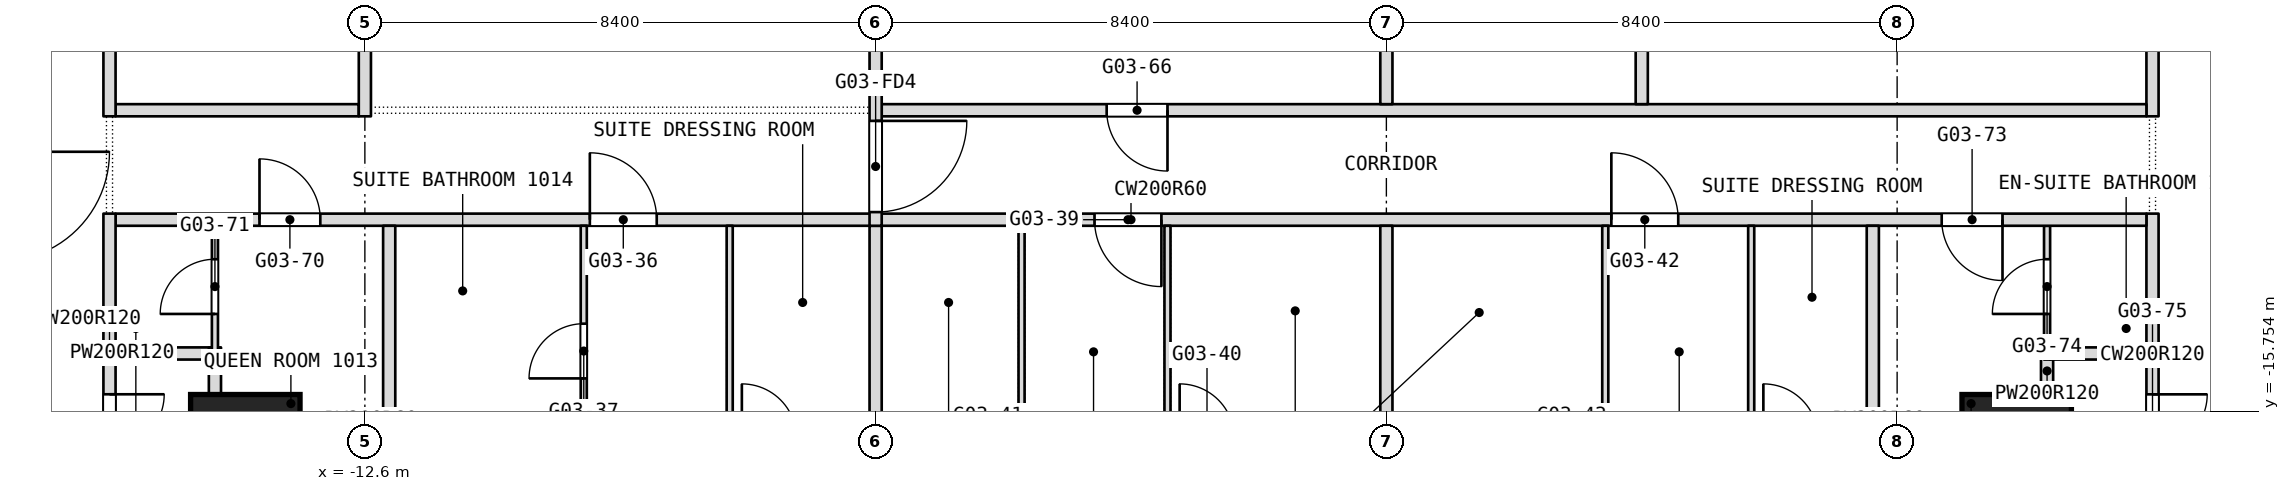
"""IFC4 building model, lengths in metres.
Left out: names, types, materials, properties, quantities, classifications, styles, units other than length and angle.
Written with IfcOpenShell. Run it as: python <this file> out.ifc"""

import sys

from ifc_helpers import new_model, si_unit, direction, frame, frame_2d, origin, origin_2d, place, context, subcontext, project, spatial, rectangle, extrude, element, fill, save


model = new_model("IFC4")
c1 = context("Model", 3, precision=1e-05, world=origin(), true_north=direction((0.0, 1.0)))
c2 = subcontext(c1, "Body", "Model", "MODEL_VIEW")
j1 = project(units=[si_unit("LENGTHUNIT", "METRE"), si_unit("PLANEANGLEUNIT", "RADIAN")], contexts=[c1])
p1 = place(None, origin())
s1 = spatial("IfcSite", under=j1, at=p1, CompositionType="ELEMENT")
p2 = place(p1, origin())
s2 = spatial("IfcBuilding", under=s1, at=p2, CompositionType="ELEMENT")
p3 = place(p2, frame((0.0, 0.0, 50.9)))
s3 = spatial("IfcBuildingStorey", under=s2, at=p3, CompositionType="ELEMENT", Elevation=50.9)
for number, where, z_axis, x_axis in (
    (1, (-14.566, -16.375, 0.0), (0.0, 0.0, 1.0), (1.0, 0.0, 0.0)),
    (2, (14.566, -16.375, 0.0), (0.0, 0.0, 1.0), (1.0, 0.0, 0.0)),
):
    element("IfcColumn", number, at=place(p3, frame(where, z_axis=z_axis, x_axis=x_axis)), inside=s3, PredefinedType="COLUMN", context=c2, shape_type="SweptSolid", body=[
        extrude(rectangle(XDim=1.8, YDim=1.8, at=origin_2d()), origin(), (0.0, 0.0, 1.0), 3.6),
    ])
p4 = place(p3, frame((16.8, -17.143, 0.0), z_axis=(0.0, 0.0, 1.0), x_axis=(0.0, 1.0, 0.0)))
e3 = element("IfcWall", 3, at=p4, inside=s3, PredefinedType="PARTITIONING", context=c2, shape_type="SweptSolid", body=[
    extrude(rectangle(XDim=4.643, YDim=0.2, at=frame_2d((2.322, 0.0))), origin(), (0.0, 0.0, 1.0), 3.34),
])
p5 = place(p4, frame((0.771, 0.0, 0.0)))
e4 = element("IfcOpeningElement", 4, at=p5, cuts=e3, PredefinedType="OPENING", context=c2, shape_type="SweptSolid", body=[
    extrude(rectangle(XDim=0.9, YDim=2.1, at=frame_2d((0.45, 1.05))), frame((0.0, 0.1, 0.0), z_axis=(0.0, -1.0, 0.0), x_axis=(1.0, 0.0, 0.0)), (0.0, 0.0, 1.0), 0.2),
])
p6 = place(p3, frame((16.8, -10.9, 0.0), z_axis=(0.0, 0.0, 1.0), x_axis=(0.0, 1.0, 0.0)))
e5 = element("IfcWall", 5, at=p6, inside=s3, PredefinedType="PARTITIONING", context=c2, shape_type="SweptSolid", body=[
    extrude(rectangle(XDim=7.3, YDim=0.2, at=frame_2d((3.65, 0.0))), origin(), (0.0, 0.0, 1.0), 3.34),
])
p7 = place(p6, frame((3.15, 0.0, 0.0)))
e6 = element("IfcOpeningElement", 6, at=p7, cuts=e5, PredefinedType="OPENING", context=c2, shape_type="SweptSolid", body=[
    extrude(rectangle(XDim=1.0, YDim=2.1, at=frame_2d((0.5, 1.05))), frame((0.0, 0.1, 0.0), z_axis=(0.0, -1.0, 0.0), x_axis=(1.0, 0.0, 0.0)), (0.0, 0.0, 1.0), 0.2),
])
p8 = place(p3, frame((15.066, -15.475, 0.0), z_axis=(0.0, 0.0, 1.0), x_axis=(0.0, 1.0, 0.0)))
e7 = element("IfcWall", 7, at=p8, inside=s3, PredefinedType="PARTITIONING", context=c2, shape_type="SweptSolid", body=[
    extrude(rectangle(XDim=0.775, YDim=0.2, at=frame_2d((0.388, 0.0))), origin(), (0.0, 0.0, 1.0), 3.34),
])
p9 = place(p3, frame((15.066, -14.9, 0.0), z_axis=(0.0, 0.0, 1.0), x_axis=(0.0, 1.0, 0.0)))
e8 = element("IfcWall", 8, at=p9, inside=s3, PredefinedType="PARTITIONING", context=c2, shape_type="SweptSolid", body=[
    extrude(rectangle(XDim=2.2, YDim=0.1, at=frame_2d((1.1, 0.0))), origin(), (0.0, 0.0, 1.0), 3.34),
])
p10 = place(p9, frame((0.75, 0.0, 0.0)))
e9 = element("IfcOpeningElement", 9, at=p10, cuts=e8, PredefinedType="OPENING", context=c2, shape_type="SweptSolid", body=[
    extrude(rectangle(XDim=0.9, YDim=2.1, at=frame_2d((0.45, 1.05))), frame((0.0, 0.05, 0.0), z_axis=(0.0, -1.0, 0.0), x_axis=(1.0, 0.0, 0.0)), (0.0, 0.0, 1.0), 0.1),
])
for number, where, z_axis, x_axis in (
    (10, (-16.7, -14.8, 0.0), (0.0, 0.0, 1.0), (1.0, 0.0, 0.0)),
    (11, (15.116, -14.8, 0.0), (0.0, 0.0, 1.0), (1.0, 0.0, 0.0)),
):
    element("IfcWall", number, at=place(p3, frame(where, z_axis=z_axis, x_axis=x_axis)), inside=s3, PredefinedType="PARTITIONING", context=c2, shape_type="SweptSolid", body=[
        extrude(rectangle(XDim=1.584, YDim=0.2, at=frame_2d((0.792, 0.0))), origin(), (0.0, 0.0, 1.0), 3.34),
    ])
p11 = place(p3, frame((-16.7, -12.6, 0.0), z_axis=(0.0, 0.0, 1.0), x_axis=(1.0, 0.0, 0.0)))
e12 = element("IfcWall", 12, at=p11, inside=s3, PredefinedType="PARTITIONING", context=c2, shape_type="SweptSolid", body=[
    extrude(rectangle(XDim=33.4, YDim=0.2, at=frame_2d((16.7, 0.0))), origin(), (0.0, 0.0, 1.0), 3.34),
])
p12 = place(p11, frame((7.8, 0.0, 0.0)))
e13 = element("IfcOpeningElement", 13, at=p12, cuts=e12, PredefinedType="OPENING", context=c2, shape_type="SweptSolid", body=[
    extrude(rectangle(XDim=1.1, YDim=2.1, at=frame_2d((0.55, 1.05))), frame((0.0, 0.1, 0.0), z_axis=(0.0, -1.0, 0.0), x_axis=(1.0, 0.0, 0.0)), (0.0, 0.0, 1.0), 0.2),
])
p13 = place(p11, frame((16.1, 0.0, 0.0)))
e14 = element("IfcOpeningElement", 14, at=p13, cuts=e12, PredefinedType="OPENING", context=c2, shape_type="SweptSolid", body=[
    extrude(rectangle(XDim=1.1, YDim=2.1, at=frame_2d((0.55, 1.05))), frame((0.0, 0.1, 0.0), z_axis=(0.0, -1.0, 0.0), x_axis=(1.0, 0.0, 0.0)), (0.0, 0.0, 1.0), 0.2),
])
p14 = place(p11, frame((24.6, 0.0, 0.0)))
e15 = element("IfcOpeningElement", 15, at=p14, cuts=e12, PredefinedType="OPENING", context=c2, shape_type="SweptSolid", body=[
    extrude(rectangle(XDim=1.1, YDim=2.1, at=frame_2d((0.55, 1.05))), frame((0.0, 0.1, 0.0), z_axis=(0.0, -1.0, 0.0), x_axis=(1.0, 0.0, 0.0)), (0.0, 0.0, 1.0), 0.2),
])
p15 = place(p11, frame((2.367, 0.0, 0.0)))
e16 = element("IfcOpeningElement", 16, at=p15, cuts=e12, PredefinedType="OPENING", context=c2, shape_type="SweptSolid", body=[
    extrude(rectangle(XDim=1.0, YDim=2.1, at=frame_2d((0.5, 1.05))), frame((0.0, 0.1, 0.0), z_axis=(0.0, -1.0, 0.0), x_axis=(1.0, 0.0, 0.0)), (0.0, 0.0, 1.0), 0.2),
])
p16 = place(p11, frame((30.033, 0.0, 0.0)))
e17 = element("IfcOpeningElement", 17, at=p16, cuts=e12, PredefinedType="OPENING", context=c2, shape_type="SweptSolid", body=[
    extrude(rectangle(XDim=1.0, YDim=2.1, at=frame_2d((0.5, 1.05))), frame((0.0, 0.1, 0.0), z_axis=(0.0, -1.0, 0.0), x_axis=(1.0, 0.0, 0.0)), (0.0, 0.0, 1.0), 0.2),
])
p17 = place(p3, frame((12.2, -15.8, 0.0), z_axis=(0.0, 0.0, 1.0), x_axis=(0.0, 1.0, 0.0)))
e18 = element("IfcWall", 18, at=p17, inside=s3, PredefinedType="PARTITIONING", context=c2, shape_type="SweptSolid", body=[
    extrude(rectangle(XDim=3.1, YDim=0.2, at=frame_2d((1.55, 0.0))), origin(), (0.0, 0.0, 1.0), 3.34),
])
p18 = place(p3, frame((-16.7, -10.8, 0.0), z_axis=(0.0, 0.0, 1.0), x_axis=(1.0, 0.0, 0.0)))
e19 = element("IfcWall", 19, at=p18, inside=s3, PredefinedType="PARTITIONING", context=c2, shape_type="SweptSolid", body=[
    extrude(rectangle(XDim=4.0, YDim=0.2, at=frame_2d((2.0, 0.0))), origin(), (0.0, 0.0, 1.0), 3.34),
])
p19 = place(p3, frame((-4.1, -10.8, 0.0), z_axis=(0.0, 0.0, 1.0), x_axis=(1.0, 0.0, 0.0)))
e20 = element("IfcWall", 20, at=p19, inside=s3, PredefinedType="PARTITIONING", context=c2, shape_type="SweptSolid", body=[
    extrude(rectangle(XDim=20.8, YDim=0.2, at=frame_2d((10.4, 0.0))), origin(), (0.0, 0.0, 1.0), 3.34),
])
p20 = place(p19, frame((3.7, 0.0, 0.0)))
e21 = element("IfcOpeningElement", 21, at=p20, cuts=e20, PredefinedType="OPENING", context=c2, shape_type="SweptSolid", body=[
    extrude(rectangle(XDim=1.0, YDim=2.1, at=frame_2d((0.5, 1.05))), frame((0.0, 0.1, 0.0), z_axis=(0.0, -1.0, 0.0), x_axis=(1.0, 0.0, 0.0)), (0.0, 0.0, 1.0), 0.2),
])
p21 = place(p3, frame((10.2, -16.25, 0.0), z_axis=(0.0, 0.0, 1.0), x_axis=(0.0, 1.0, 0.0)))
e22 = element("IfcWall", 22, at=p21, inside=s3, PredefinedType="PARTITIONING", context=c2, shape_type="SweptSolid", body=[
    extrude(rectangle(XDim=3.55, YDim=0.1, at=frame_2d((1.775, 0.0))), origin(), (0.0, 0.0, 1.0), 3.34),
])
p22 = place(p3, frame((8.4, -10.7, 0.0), z_axis=(0.0, 0.0, 1.0), x_axis=(0.0, 1.0, 0.0)))
e23 = element("IfcWall", 23, at=p22, inside=s3, PredefinedType="PARTITIONING", context=c2, shape_type="SweptSolid", body=[
    extrude(rectangle(XDim=3.6, YDim=0.2, at=frame_2d((1.8, 0.0))), origin(), (0.0, 0.0, 1.0), 3.34),
])
p23 = place(p3, frame((7.8, -16.15, 0.0), z_axis=(0.0, 0.0, 1.0), x_axis=(0.0, 1.0, 0.0)))
e24 = element("IfcWall", 24, at=p23, inside=s3, PredefinedType="PARTITIONING", context=c2, shape_type="SweptSolid", body=[
    extrude(rectangle(XDim=3.45, YDim=0.1, at=frame_2d((1.725, 0.0))), origin(), (0.0, 0.0, 1.0), 3.34),
])
p24 = place(p3, frame((4.2, -17.7, 0.0), z_axis=(0.0, 0.0, 1.0), x_axis=(0.0, 1.0, 0.0)))
e25 = element("IfcWall", 25, at=p24, inside=s3, PredefinedType="PARTITIONING", context=c2, shape_type="SweptSolid", body=[
    extrude(rectangle(XDim=5.0, YDim=0.2, at=frame_2d((2.5, 0.0))), origin(), (0.0, 0.0, 1.0), 3.34),
])
p25 = place(p3, frame((4.2, -10.7, 0.0), z_axis=(0.0, 0.0, 1.0), x_axis=(0.0, 1.0, 0.0)))
e26 = element("IfcWall", 26, at=p25, inside=s3, PredefinedType="PARTITIONING", context=c2, shape_type="SweptSolid", body=[
    extrude(rectangle(XDim=8.8, YDim=0.2, at=frame_2d((4.4, 0.0))), origin(), (0.0, 0.0, 1.0), 3.34),
])
p26 = place(p3, frame((0.6, -16.25, 0.0), z_axis=(0.0, 0.0, 1.0), x_axis=(0.0, 1.0, 0.0)))
e27 = element("IfcWall", 27, at=p26, inside=s3, PredefinedType="PARTITIONING", context=c2, shape_type="SweptSolid", body=[
    extrude(rectangle(XDim=3.55, YDim=0.1, at=frame_2d((1.775, 0.0))), origin(), (0.0, 0.0, 1.0), 3.34),
])
p27 = place(p3, frame((-1.8, -16.15, 0.0), z_axis=(0.0, 0.0, 1.0), x_axis=(0.0, 1.0, 0.0)))
e28 = element("IfcWall", 28, at=p27, inside=s3, PredefinedType="PARTITIONING", context=c2, shape_type="SweptSolid", body=[
    extrude(rectangle(XDim=3.45, YDim=0.1, at=frame_2d((1.725, 0.0))), origin(), (0.0, 0.0, 1.0), 3.34),
])
p28 = place(p3, frame((-4.2, -17.7, 0.0), z_axis=(0.0, 0.0, 1.0), x_axis=(0.0, 1.0, 0.0)))
e29 = element("IfcWall", 29, at=p28, inside=s3, PredefinedType="PARTITIONING", context=c2, shape_type="SweptSolid", body=[
    extrude(rectangle(XDim=5.0, YDim=0.2, at=frame_2d((2.5, 0.0))), origin(), (0.0, 0.0, 1.0), 3.34),
])
p29 = place(p3, frame((-4.2, -12.7, 0.0), z_axis=(0.0, 0.0, 1.0), x_axis=(0.0, 1.0, 0.0)))
e30 = element("IfcWall", 30, at=p29, inside=s3, PredefinedType="PARTITIONING", context=c2, shape_type="SweptSolid", body=[
    extrude(rectangle(XDim=12.7, YDim=0.2, at=frame_2d((6.35, 0.0))), origin(), (0.0, 0.0, 1.0), 3.34),
])
p30 = place(p29, frame((11.05, 0.0, 0.0)))
e31 = element("IfcOpeningElement", 31, at=p30, cuts=e30, PredefinedType="OPENING", context=c2, shape_type="SweptSolid", body=[
    extrude(rectangle(XDim=1.5, YDim=2.1, at=frame_2d((0.75, 1.05))), frame((0.0, 0.1, 0.0), z_axis=(0.0, -1.0, 0.0), x_axis=(1.0, 0.0, 0.0)), (0.0, 0.0, 1.0), 0.2),
])
p31 = place(p29, frame((0.225, 0.0, 0.0)))
e32 = element("IfcOpeningElement", 32, at=p31, cuts=e30, PredefinedType="OPENING", context=c2, shape_type="SweptSolid", body=[
    extrude(rectangle(XDim=1.5, YDim=2.1, at=frame_2d((0.75, 1.05))), frame((0.0, 0.1, 0.0), z_axis=(0.0, -1.0, 0.0), x_axis=(1.0, 0.0, 0.0)), (0.0, 0.0, 1.0), 0.2),
])
p32 = place(p3, frame((-6.6, -16.25, 0.0), z_axis=(0.0, 0.0, 1.0), x_axis=(0.0, 1.0, 0.0)))
e33 = element("IfcWall", 33, at=p32, inside=s3, PredefinedType="PARTITIONING", context=c2, shape_type="SweptSolid", body=[
    extrude(rectangle(XDim=3.55, YDim=0.1, at=frame_2d((1.775, 0.0))), origin(), (0.0, 0.0, 1.0), 3.34),
])
p33 = place(p3, frame((-9.0, -16.15, 0.0), z_axis=(0.0, 0.0, 1.0), x_axis=(0.0, 1.0, 0.0)))
e34 = element("IfcWall", 34, at=p33, inside=s3, PredefinedType="PARTITIONING", context=c2, shape_type="SweptSolid", body=[
    extrude(rectangle(XDim=3.45, YDim=0.1, at=frame_2d((1.725, 0.0))), origin(), (0.0, 0.0, 1.0), 3.34),
])
p34 = place(p33, frame((0.94, 0.0, 0.0)))
e35 = element("IfcOpeningElement", 35, at=p34, cuts=e34, PredefinedType="OPENING", context=c2, shape_type="SweptSolid", body=[
    extrude(rectangle(XDim=0.9, YDim=2.1, at=frame_2d((0.45, 1.05))), frame((0.0, 0.05, 0.0), z_axis=(0.0, -1.0, 0.0), x_axis=(1.0, 0.0, 0.0)), (0.0, 0.0, 1.0), 0.1),
])
p35 = place(p3, frame((-12.2, -16.0, 0.0), z_axis=(0.0, 0.0, 1.0), x_axis=(0.0, 1.0, 0.0)))
e36 = element("IfcWall", 36, at=p35, inside=s3, PredefinedType="PARTITIONING", context=c2, shape_type="SweptSolid", body=[
    extrude(rectangle(XDim=3.3, YDim=0.2, at=frame_2d((1.65, 0.0))), origin(), (0.0, 0.0, 1.0), 3.34),
])
p36 = place(p3, frame((-12.6, -10.9, 0.0), z_axis=(0.0, 0.0, 1.0), x_axis=(0.0, 1.0, 0.0)))
e37 = element("IfcWall", 37, at=p36, inside=s3, PredefinedType="PARTITIONING", context=c2, shape_type="SweptSolid", body=[
    extrude(rectangle(XDim=5.6, YDim=0.2, at=frame_2d((2.8, 0.0))), origin(), (0.0, 0.0, 1.0), 3.34),
])
p37 = place(p3, frame((-15.066, -15.475, 0.0), z_axis=(0.0, 0.0, 1.0), x_axis=(0.0, 1.0, 0.0)))
e38 = element("IfcWall", 38, at=p37, inside=s3, PredefinedType="PARTITIONING", context=c2, shape_type="SweptSolid", body=[
    extrude(rectangle(XDim=0.775, YDim=0.2, at=frame_2d((0.388, 0.0))), origin(), (0.0, 0.0, 1.0), 3.34),
])
p38 = place(p3, frame((-15.066, -14.9, 0.0), z_axis=(0.0, 0.0, 1.0), x_axis=(0.0, 1.0, 0.0)))
e39 = element("IfcWall", 39, at=p38, inside=s3, PredefinedType="PARTITIONING", context=c2, shape_type="SweptSolid", body=[
    extrude(rectangle(XDim=2.2, YDim=0.1, at=frame_2d((1.1, 0.0))), origin(), (0.0, 0.0, 1.0), 3.34),
])
p39 = place(p38, frame((0.75, 0.0, 0.0)))
e40 = element("IfcOpeningElement", 40, at=p39, cuts=e39, PredefinedType="OPENING", context=c2, shape_type="SweptSolid", body=[
    extrude(rectangle(XDim=0.9, YDim=2.1, at=frame_2d((0.45, 1.05))), frame((0.0, 0.05, 0.0), z_axis=(0.0, -1.0, 0.0), x_axis=(1.0, 0.0, 0.0)), (0.0, 0.0, 1.0), 0.1),
])
p40 = place(p3, frame((-16.8, -17.143, 0.0), z_axis=(0.0, 0.0, 1.0), x_axis=(0.0, 1.0, 0.0)))
e41 = element("IfcWall", 41, at=p40, inside=s3, PredefinedType="PARTITIONING", context=c2, shape_type="SweptSolid", body=[
    extrude(rectangle(XDim=4.643, YDim=0.2, at=frame_2d((2.322, 0.0))), origin(), (0.0, 0.0, 1.0), 3.34),
])
p41 = place(p40, frame((0.772, 0.0, 0.0)))
e42 = element("IfcOpeningElement", 42, at=p41, cuts=e41, PredefinedType="OPENING", context=c2, shape_type="SweptSolid", body=[
    extrude(rectangle(XDim=0.9, YDim=2.1, at=frame_2d((0.45, 1.05))), frame((0.0, 0.1, 0.0), z_axis=(0.0, -1.0, 0.0), x_axis=(1.0, 0.0, 0.0)), (0.0, 0.0, 1.0), 0.2),
])
p42 = place(p3, frame((-16.8, -10.9, 0.0), z_axis=(0.0, 0.0, 1.0), x_axis=(0.0, 1.0, 0.0)))
e43 = element("IfcWall", 43, at=p42, inside=s3, PredefinedType="PARTITIONING", context=c2, shape_type="SweptSolid", body=[
    extrude(rectangle(XDim=9.0, YDim=0.2, at=frame_2d((4.5, 0.0))), origin(), (0.0, 0.0, 1.0), 3.34),
])
p43 = place(p5, origin())
e44 = element("IfcDoor", 44, at=p43, inside=s3, OperationType="SINGLE_SWING_RIGHT", PredefinedType="DOOR", context=c2, shape_type="SweptSolid", body=[
    extrude(rectangle(XDim=0.9, YDim=2.1, at=frame_2d((0.45, 1.05))), frame((0.0, 0.025, 0.0), z_axis=(0.0, -1.0, 0.0), x_axis=(1.0, 0.0, 0.0)), (0.0, 0.0, 1.0), 0.05),
])
fill(e4, e44)
p44 = place(p10, origin())
e45 = element("IfcDoor", 45, at=p44, inside=s3, OperationType="SINGLE_SWING_RIGHT", PredefinedType="DOOR", context=c2, shape_type="SweptSolid", body=[
    extrude(rectangle(XDim=0.9, YDim=2.1, at=frame_2d((0.45, 1.05))), frame((0.0, 0.025, 0.0), z_axis=(0.0, -1.0, 0.0), x_axis=(1.0, 0.0, 0.0)), (0.0, 0.0, 1.0), 0.05),
])
fill(e9, e45)
p45 = place(p12, origin())
e46 = element("IfcDoor", 46, at=p45, inside=s3, OperationType="SINGLE_SWING_RIGHT", PredefinedType="DOOR", context=c2, shape_type="SweptSolid", body=[
    extrude(rectangle(XDim=1.1, YDim=2.1, at=frame_2d((0.55, 1.05))), frame((0.0, 0.025, 0.0), z_axis=(0.0, -1.0, 0.0), x_axis=(1.0, 0.0, 0.0)), (0.0, 0.0, 1.0), 0.05),
])
fill(e13, e46)
p46 = place(p13, origin())
e47 = element("IfcDoor", 47, at=p46, inside=s3, OperationType="SINGLE_SWING_LEFT", PredefinedType="DOOR", context=c2, shape_type="SweptSolid", body=[
    extrude(rectangle(XDim=1.1, YDim=2.1, at=frame_2d((0.55, 1.05))), frame((0.0, 0.025, 0.0), z_axis=(0.0, -1.0, 0.0), x_axis=(1.0, 0.0, 0.0)), (0.0, 0.0, 1.0), 0.05),
])
fill(e14, e47)
p47 = place(p14, origin())
e48 = element("IfcDoor", 48, at=p47, inside=s3, OperationType="SINGLE_SWING_RIGHT", PredefinedType="DOOR", context=c2, shape_type="SweptSolid", body=[
    extrude(rectangle(XDim=1.1, YDim=2.1, at=frame_2d((0.55, 1.05))), frame((0.0, 0.025, 0.0), z_axis=(0.0, -1.0, 0.0), x_axis=(1.0, 0.0, 0.0)), (0.0, 0.0, 1.0), 0.05),
])
fill(e15, e48)
p48 = place(p15, origin())
e49 = element("IfcDoor", 49, at=p48, inside=s3, OperationType="SINGLE_SWING_RIGHT", PredefinedType="DOOR", context=c2, shape_type="SweptSolid", body=[
    extrude(rectangle(XDim=1.0, YDim=2.1, at=frame_2d((0.5, 1.05))), frame((0.0, 0.025, 0.0), z_axis=(0.0, -1.0, 0.0), x_axis=(1.0, 0.0, 0.0)), (0.0, 0.0, 1.0), 0.05),
])
fill(e16, e49)
p49 = place(p16, origin())
e50 = element("IfcDoor", 50, at=p49, inside=s3, OperationType="SINGLE_SWING_LEFT", PredefinedType="DOOR", context=c2, shape_type="SweptSolid", body=[
    extrude(rectangle(XDim=1.0, YDim=2.1, at=frame_2d((0.5, 1.05))), frame((0.0, 0.025, 0.0), z_axis=(0.0, -1.0, 0.0), x_axis=(1.0, 0.0, 0.0)), (0.0, 0.0, 1.0), 0.05),
])
fill(e17, e50)
p50 = place(p20, origin())
e51 = element("IfcDoor", 51, at=p50, inside=s3, OperationType="SINGLE_SWING_RIGHT", PredefinedType="DOOR", context=c2, shape_type="SweptSolid", body=[
    extrude(rectangle(XDim=1.0, YDim=2.1, at=frame_2d((0.5, 1.05))), frame((0.0, 0.025, 0.0), z_axis=(0.0, -1.0, 0.0), x_axis=(1.0, 0.0, 0.0)), (0.0, 0.0, 1.0), 0.05),
])
fill(e21, e51)
p51 = place(p34, origin())
e52 = element("IfcDoor", 52, at=p51, inside=s3, OperationType="SINGLE_SWING_LEFT", PredefinedType="DOOR", context=c2, shape_type="SweptSolid", body=[
    extrude(rectangle(XDim=0.9, YDim=2.1, at=frame_2d((0.45, 1.05))), frame((0.0, 0.025, 0.0), z_axis=(0.0, -1.0, 0.0), x_axis=(1.0, 0.0, 0.0)), (0.0, 0.0, 1.0), 0.05),
])
fill(e35, e52)
p52 = place(p39, origin())
e53 = element("IfcDoor", 53, at=p52, inside=s3, OperationType="SINGLE_SWING_RIGHT", PredefinedType="DOOR", context=c2, shape_type="SweptSolid", body=[
    extrude(rectangle(XDim=0.9, YDim=2.1, at=frame_2d((0.45, 1.05))), frame((0.0, 0.025, 0.0), z_axis=(0.0, -1.0, 0.0), x_axis=(1.0, 0.0, 0.0)), (0.0, 0.0, 1.0), 0.05),
])
fill(e40, e53)
p53 = place(p41, origin())
e54 = element("IfcDoor", 54, at=p53, inside=s3, OperationType="SINGLE_SWING_LEFT", PredefinedType="DOOR", context=c2, shape_type="SweptSolid", body=[
    extrude(rectangle(XDim=0.9, YDim=2.1, at=frame_2d((0.45, 1.05))), frame((0.0, 0.025, 0.0), z_axis=(0.0, -1.0, 0.0), x_axis=(1.0, 0.0, 0.0)), (0.0, 0.0, 1.0), 0.05),
])
fill(e42, e54)
p54 = place(p31, origin())
e55 = element("IfcDoor", 55, at=p54, inside=s3, OperationType="DOUBLE_DOOR_DOUBLE_SWING", PredefinedType="DOOR", context=c2, shape_type="SweptSolid", body=[
    extrude(rectangle(XDim=1.5, YDim=2.1, at=frame_2d((0.75, 1.05))), frame((0.0, 0.025, 0.0), z_axis=(0.0, -1.0, 0.0), x_axis=(1.0, 0.0, 0.0)), (0.0, 0.0, 1.0), 0.05),
])
fill(e32, e55)
save(model, sys.argv[1])
